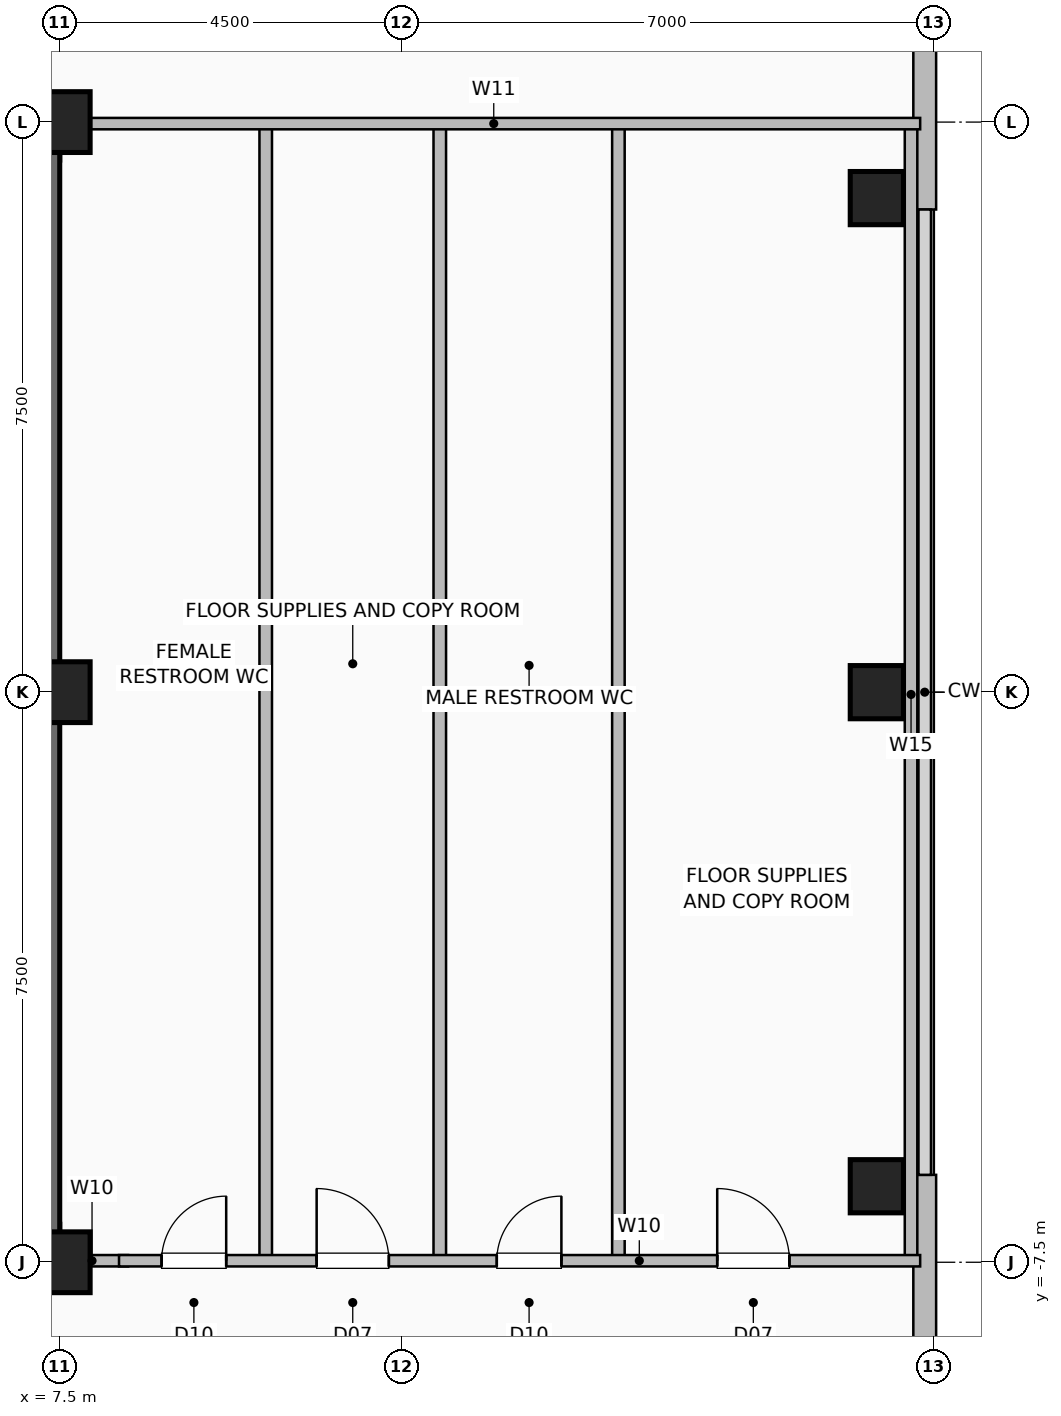
"""IFC4 building model, lengths in metres.
Left out: names, types, materials, properties, quantities, classifications, styles, units other than length and angle.
Written with IfcOpenShell. Run it as: python <this file> out.ifc"""

import sys

from ifc_helpers import new_model, si_unit, direction, frame, frame_2d, origin, origin_2d, place, context, subcontext, project, spatial, rectangle, hollow_rectangle, extrude, element, fill, save


model = new_model("IFC4")
c1 = context("Model", 3, precision=1e-05, world=origin(), true_north=direction((0.0, 1.0)))
c2 = subcontext(c1, "Body", "Model", "MODEL_VIEW")
j1 = project(units=[si_unit("LENGTHUNIT", "METRE"), si_unit("PLANEANGLEUNIT", "RADIAN")], contexts=[c1])
p1 = place(None, origin())
s1 = spatial("IfcSite", under=j1, at=p1, CompositionType="ELEMENT")
p2 = place(p1, origin())
s2 = spatial("IfcBuilding", under=s1, at=p2, CompositionType="ELEMENT")
p3 = place(p2, frame((0.0, 0.0, 279.2)))
s3 = spatial("IfcBuildingStorey", under=s2, at=p3, CompositionType="ELEMENT", Elevation=279.2)
for number, where, z_axis, x_axis in (
    (1, (7.5, -7.5, 0.0), (0.0, 0.0, 1.0), (1.0, 0.0, 0.0)),
    (2, (7.5, 0.0, 0.0), (0.0, 0.0, 1.0), (1.0, 0.0, 0.0)),
    (3, (7.5, 7.5, 0.0), (0.0, 0.0, 1.0), (1.0, 0.0, 0.0)),
):
    element("IfcColumn", number, at=place(p3, frame(where, z_axis=z_axis, x_axis=x_axis)), inside=s3, PredefinedType="COLUMN", context=c2, shape_type="SweptSolid", body=[
        extrude(hollow_rectangle(XDim=0.8, YDim=0.8, WallThickness=0.04, at=origin_2d()), origin(), (0.0, 0.0, 1.0), 3.6),
    ])
for number, where, z_axis, x_axis in (
    (4, (18.25, -6.5, 0.0), (0.0, 0.0, 1.0), (1.0, 0.0, 0.0)),
    (5, (18.25, 0.0, 0.0), (0.0, 0.0, 1.0), (1.0, 0.0, 0.0)),
    (6, (18.25, 6.5, 0.0), (0.0, 0.0, 1.0), (1.0, 0.0, 0.0)),
):
    element("IfcColumn", number, at=place(p3, frame(where, z_axis=z_axis, x_axis=x_axis)), inside=s3, PredefinedType="COLUMN", context=c2, shape_type="SweptSolid", body=[
        extrude(hollow_rectangle(XDim=0.7, YDim=0.7, WallThickness=0.035, at=origin_2d()), origin(), (0.0, 0.0, 1.0), 3.6),
    ])
for number, where, z_axis, x_axis in (
    (7, (18.88, -11.65, 0.0), (0.0, 0.0, 1.0), (0.0, 1.0, 0.0)),
    (8, (18.88, 6.35, 0.0), (0.0, 0.0, 1.0), (0.0, 1.0, 0.0)),
):
    element("IfcWall", number, at=place(p3, frame(where, z_axis=z_axis, x_axis=x_axis)), inside=s3, PredefinedType="SOLIDWALL", context=c2, shape_type="SweptSolid", body=[
        extrude(rectangle(XDim=5.3, YDim=0.3, at=frame_2d((2.65, 0.0))), origin(), (0.0, 0.0, 1.0), 3.36),
    ])
p4 = place(p3, frame((-7.5, -7.25, 0.0), z_axis=(0.0, 0.0, 1.0), x_axis=(1.0, 0.0, 0.0)))
e9 = element("IfcWall", 9, at=p4, inside=s3, PredefinedType="SHEAR", context=c2, shape_type="SweptSolid", body=[
    extrude(rectangle(XDim=15.0, YDim=0.5, at=frame_2d((7.5, 0.0))), origin(), (0.0, 0.0, 1.0), 3.36),
])
p5 = place(p4, frame((1.55, 0.0, 0.0)))
e10 = element("IfcOpeningElement", 10, at=p5, cuts=e9, PredefinedType="OPENING", context=c2, shape_type="SweptSolid", body=[
    extrude(rectangle(XDim=1.05, YDim=2.08, at=frame_2d((0.525, 1.04))), frame((0.0, 0.26, 0.0), z_axis=(0.0, -1.0, 0.0), x_axis=(1.0, 0.0, 0.0)), (0.0, 0.0, 1.0), 0.52),
])
p6 = place(p4, frame((12.4, 0.0, 0.0)))
e11 = element("IfcOpeningElement", 11, at=p6, cuts=e9, PredefinedType="OPENING", context=c2, shape_type="SweptSolid", body=[
    extrude(rectangle(XDim=1.05, YDim=2.08, at=frame_2d((0.525, 1.04))), frame((0.0, 0.26, 0.0), z_axis=(0.0, -1.0, 0.0), x_axis=(1.0, 0.0, 0.0)), (0.0, 0.0, 1.0), 0.52),
])
p7 = place(p4, frame((4.95, 0.0, 0.0)))
e12 = element("IfcOpeningElement", 12, at=p7, cuts=e9, PredefinedType="OPENING", context=c2, shape_type="SweptSolid", body=[
    extrude(rectangle(XDim=1.0, YDim=2.08, at=frame_2d((0.5, 1.04))), frame((0.0, 0.26, 0.0), z_axis=(0.0, -1.0, 0.0), x_axis=(1.0, 0.0, 0.0)), (0.0, 0.0, 1.0), 0.52),
])
p8 = place(p4, frame((7.05, 0.0, 0.0)))
e13 = element("IfcOpeningElement", 13, at=p8, cuts=e9, PredefinedType="OPENING", context=c2, shape_type="SweptSolid", body=[
    extrude(rectangle(XDim=1.0, YDim=2.08, at=frame_2d((0.5, 1.04))), frame((0.0, 0.26, 0.0), z_axis=(0.0, -1.0, 0.0), x_axis=(1.0, 0.0, 0.0)), (0.0, 0.0, 1.0), 0.52),
])
p9 = place(p4, frame((9.15, 0.0, 0.0)))
e14 = element("IfcOpeningElement", 14, at=p9, cuts=e9, PredefinedType="OPENING", context=c2, shape_type="SweptSolid", body=[
    extrude(rectangle(XDim=1.0, YDim=2.08, at=frame_2d((0.5, 1.04))), frame((0.0, 0.26, 0.0), z_axis=(0.0, -1.0, 0.0), x_axis=(1.0, 0.0, 0.0)), (0.0, 0.0, 1.0), 0.52),
])
for number, where, z_axis, x_axis in (
    (15, (-7.5, 7.25, 0.0), (0.0, 0.0, 1.0), (1.0, 0.0, 0.0)),
    (16, (7.25, -7.5, 0.0), (0.0, 0.0, 1.0), (0.0, 1.0, 0.0)),
):
    element("IfcWall", number, at=place(p3, frame(where, z_axis=z_axis, x_axis=x_axis)), inside=s3, PredefinedType="SHEAR", context=c2, shape_type="SweptSolid", body=[
        extrude(rectangle(XDim=15.0, YDim=0.5, at=frame_2d((7.5, 0.0))), origin(), (0.0, 0.0, 1.0), 3.36),
    ])
p10 = place(p3, frame((7.45, -7.48, 0.0), z_axis=(0.0, 0.0, 1.0), x_axis=(1.0, 0.0, 0.0)))
e17 = element("IfcWall", 17, at=p10, inside=s3, PredefinedType="PARTITIONING", context=c2, shape_type="SweptSolid", body=[
    extrude(rectangle(XDim=0.95, YDim=0.15, at=frame_2d((0.475, 0.0))), origin(), (0.0, 0.0, 1.0), 3.36),
])
for number, where, z_axis, x_axis in (
    (18, (10.21, -7.48, 0.0), (0.0, 0.0, 1.0), (0.0, 1.0, 0.0)),
    (19, (14.85, -7.48, 0.0), (0.0, 0.0, 1.0), (0.0, 1.0, 0.0)),
    (20, (12.5, -7.48, 0.0), (0.0, 0.0, 1.0), (0.0, 1.0, 0.0)),
    (21, (18.7, -7.48, 0.0), (0.0, 0.0, 1.0), (0.0, 1.0, 0.0)),
):
    element("IfcWall", number, at=place(p3, frame(where, z_axis=z_axis, x_axis=x_axis)), inside=s3, PredefinedType="PLUMBINGWALL", context=c2, shape_type="SweptSolid", body=[
        extrude(rectangle(XDim=14.9, YDim=0.165, at=frame_2d((7.45, 0.0))), origin(), (0.0, 0.0, 1.0), 3.36),
    ])
p11 = place(p3, frame((8.28, -7.48, 0.0), z_axis=(0.0, 0.0, 1.0), x_axis=(1.0, 0.0, 0.0)))
e22 = element("IfcWall", 22, at=p11, inside=s3, PredefinedType="PARTITIONING", context=c2, shape_type="SweptSolid", body=[
    extrude(rectangle(XDim=10.54, YDim=0.15, at=frame_2d((5.27, 0.0))), origin(), (0.0, 0.0, 1.0), 3.36),
])
p12 = place(p11, frame((0.56, 0.0, 0.0)))
e23 = element("IfcOpeningElement", 23, at=p12, cuts=e22, PredefinedType="OPENING", context=c2, shape_type="SweptSolid", body=[
    extrude(rectangle(XDim=0.85, YDim=2.05, at=frame_2d((0.425, 1.025))), frame((0.0, 0.085, 0.0), z_axis=(0.0, -1.0, 0.0), x_axis=(1.0, 0.0, 0.0)), (0.0, 0.0, 1.0), 0.17),
])
p13 = place(p11, frame((2.6, 0.0, 0.0)))
e24 = element("IfcOpeningElement", 24, at=p13, cuts=e22, PredefinedType="OPENING", context=c2, shape_type="SweptSolid", body=[
    extrude(rectangle(XDim=0.95, YDim=2.06, at=frame_2d((0.475, 1.03))), frame((0.0, 0.085, 0.0), z_axis=(0.0, -1.0, 0.0), x_axis=(1.0, 0.0, 0.0)), (0.0, 0.0, 1.0), 0.17),
])
p14 = place(p11, frame((4.97, 0.0, 0.0)))
e25 = element("IfcOpeningElement", 25, at=p14, cuts=e22, PredefinedType="OPENING", context=c2, shape_type="SweptSolid", body=[
    extrude(rectangle(XDim=0.85, YDim=2.05, at=frame_2d((0.425, 1.025))), frame((0.0, 0.085, 0.0), z_axis=(0.0, -1.0, 0.0), x_axis=(1.0, 0.0, 0.0)), (0.0, 0.0, 1.0), 0.17),
])
p15 = place(p11, frame((7.87, 0.0, 0.0)))
e26 = element("IfcOpeningElement", 26, at=p15, cuts=e22, PredefinedType="OPENING", context=c2, shape_type="SweptSolid", body=[
    extrude(rectangle(XDim=0.95, YDim=2.06, at=frame_2d((0.475, 1.03))), frame((0.0, 0.085, 0.0), z_axis=(0.0, -1.0, 0.0), x_axis=(1.0, 0.0, 0.0)), (0.0, 0.0, 1.0), 0.17),
])
p16 = place(p3, frame((7.6, 7.48, 0.0), z_axis=(0.0, 0.0, 1.0), x_axis=(1.0, 0.0, 0.0)))
e27 = element("IfcWall", 27, at=p16, inside=s3, PredefinedType="PARTITIONING", context=c2, shape_type="SweptSolid", body=[
    extrude(rectangle(XDim=11.22, YDim=0.15, at=frame_2d((5.61, 0.0))), origin(), (0.0, 0.0, 1.0), 3.36),
])
p17 = place(p12, origin())
e28 = element("IfcDoor", 28, at=p17, inside=s3, OperationType="SINGLE_SWING_RIGHT", PredefinedType="DOOR", context=c2, shape_type="SweptSolid", body=[
    extrude(rectangle(XDim=0.85, YDim=2.05, at=frame_2d((0.425, 1.025))), frame((0.0, 0.025, 0.0), z_axis=(0.0, -1.0, 0.0), x_axis=(1.0, 0.0, 0.0)), (0.0, 0.0, 1.0), 0.05),
])
fill(e23, e28)
p18 = place(p13, origin())
e29 = element("IfcDoor", 29, at=p18, inside=s3, OperationType="SINGLE_SWING_LEFT", PredefinedType="DOOR", context=c2, shape_type="SweptSolid", body=[
    extrude(rectangle(XDim=0.95, YDim=2.06, at=frame_2d((0.475, 1.03))), frame((0.0, 0.025, 0.0), z_axis=(0.0, -1.0, 0.0), x_axis=(1.0, 0.0, 0.0)), (0.0, 0.0, 1.0), 0.05),
])
fill(e24, e29)
p19 = place(p14, origin())
e30 = element("IfcDoor", 30, at=p19, inside=s3, OperationType="SINGLE_SWING_RIGHT", PredefinedType="DOOR", context=c2, shape_type="SweptSolid", body=[
    extrude(rectangle(XDim=0.85, YDim=2.05, at=frame_2d((0.425, 1.025))), frame((0.0, 0.025, 0.0), z_axis=(0.0, -1.0, 0.0), x_axis=(1.0, 0.0, 0.0)), (0.0, 0.0, 1.0), 0.05),
])
fill(e25, e30)
p20 = place(p15, origin())
e31 = element("IfcDoor", 31, at=p20, inside=s3, OperationType="SINGLE_SWING_LEFT", PredefinedType="DOOR", context=c2, shape_type="SweptSolid", body=[
    extrude(rectangle(XDim=0.95, YDim=2.06, at=frame_2d((0.475, 1.03))), frame((0.0, 0.025, 0.0), z_axis=(0.0, -1.0, 0.0), x_axis=(1.0, 0.0, 0.0)), (0.0, 0.0, 1.0), 0.05),
])
fill(e26, e31)
save(model, sys.argv[1])
